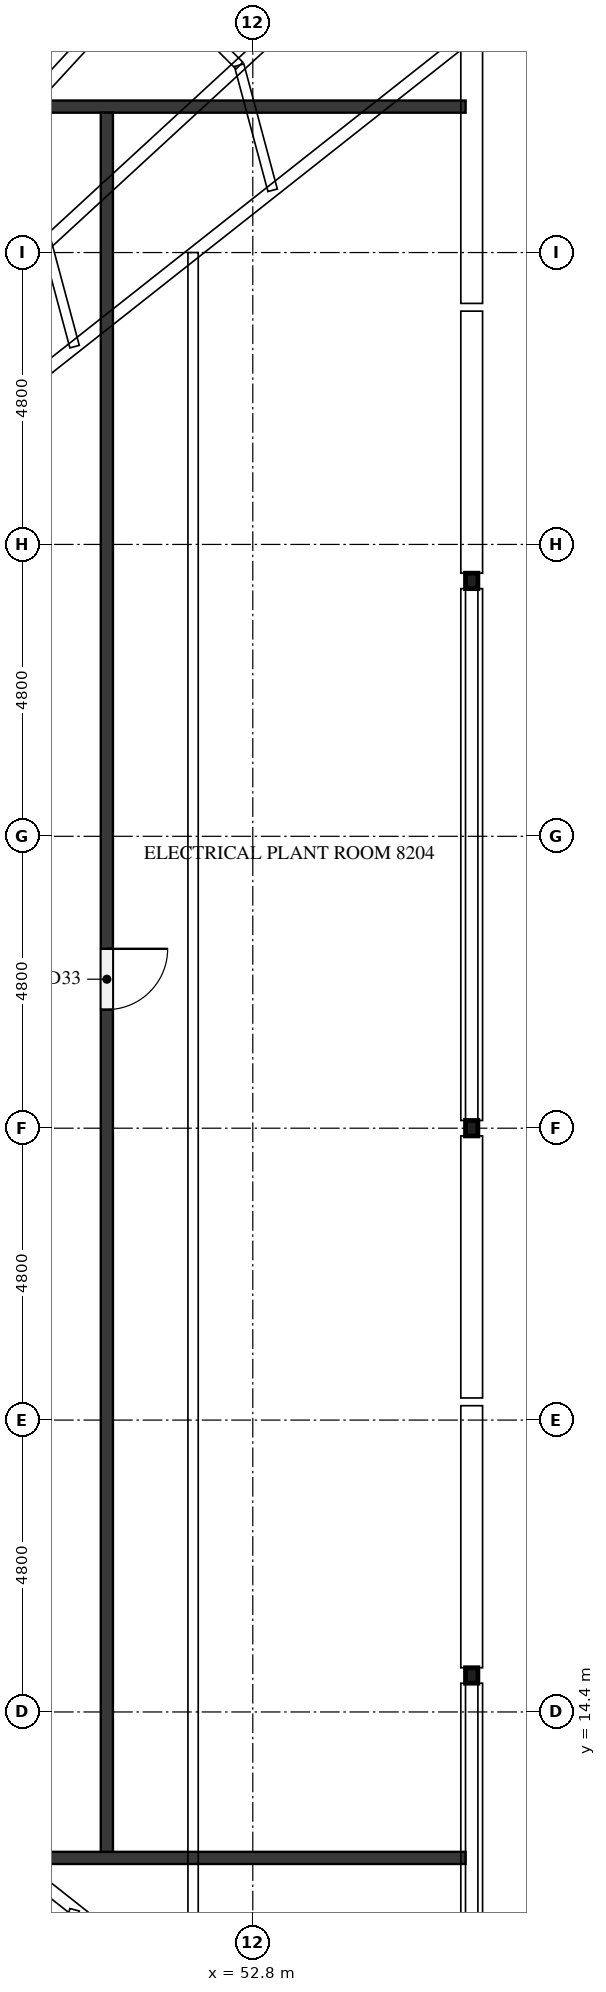
"""IFC4 building model, lengths in metres.
Left out: names, types, materials, properties, quantities, classifications, styles, units other than length and angle.
Written with IfcOpenShell. Run it as: python <this file> out.ifc"""

import sys

from ifc_helpers import new_model, si_unit, direction, frame, frame_2d, origin, origin_2d, place, context, subcontext, project, spatial, rectangle, hollow_rectangle, extrude, element, fill, save


model = new_model("IFC4")
c1 = context("Model", 3, precision=1e-05, world=origin(), true_north=direction((0.0, 1.0)))
c2 = subcontext(c1, "Body", "Model", "MODEL_VIEW")
j1 = project(units=[si_unit("LENGTHUNIT", "METRE"), si_unit("PLANEANGLEUNIT", "RADIAN")], contexts=[c1])
p1 = place(None, origin())
s1 = spatial("IfcSite", under=j1, at=p1, CompositionType="ELEMENT")
p2 = place(p1, origin())
s2 = spatial("IfcBuilding", under=s1, at=p2, CompositionType="ELEMENT")
p3 = place(p2, frame((0.0, 0.0, 317.3)))
s3 = spatial("IfcBuildingStorey", under=s2, at=p3, CompositionType="ELEMENT", Elevation=317.3)
for number, where, z_axis, x_axis in (
    (1, (56.4, 15.0, 0.0), (0.0, 0.0, 1.0), (1.0, 0.0, 0.0)),
    (2, (56.4, 24.0, 0.0), (0.0, 0.0, 1.0), (1.0, 0.0, 0.0)),
    (3, (56.4, 33.0, 0.0), (0.0, 0.0, 1.0), (1.0, 0.0, 0.0)),
):
    element("IfcColumn", number, at=place(p3, frame(where, z_axis=z_axis, x_axis=x_axis)), inside=s3, PredefinedType="COLUMN", context=c2, shape_type="SweptSolid", body=[
        extrude(hollow_rectangle(XDim=0.203, YDim=0.254, WallThickness=0.01, InnerFilletRadius=0.004, OuterFilletRadius=0.013, at=origin_2d()), origin(), (0.0, 0.0, 1.0), 3.0),
    ])
p4 = place(p3, frame((56.3, 12.0, 0.0), z_axis=(0.0, 0.0, 1.0), x_axis=(-1.0, 0.0, 0.0)))
e4 = element("IfcWall", 4, at=p4, inside=s3, PredefinedType="PARTITIONING", context=c2, shape_type="SweptSolid", body=[
    extrude(rectangle(XDim=55.0, YDim=0.2, at=frame_2d((27.5, 0.0))), origin(), (0.0, 0.0, 1.0), 3.0),
])
p5 = place(p4, frame((24.55, 0.0, 0.0)))
e5 = element("IfcOpeningElement", 5, at=p5, cuts=e4, PredefinedType="OPENING", context=c2, shape_type="SweptSolid", body=[
    extrude(rectangle(XDim=1.0, YDim=2.1, at=frame_2d((0.5, 1.05))), frame((0.0, 0.11, 0.0), z_axis=(0.0, -1.0, 0.0), x_axis=(1.0, 0.0, 0.0)), (0.0, 0.0, 1.0), 0.22),
])
p6 = place(p3, frame((1.3, 40.8, 0.0), z_axis=(0.0, 0.0, 1.0), x_axis=(1.0, 0.0, 0.0)))
e6 = element("IfcWall", 6, at=p6, inside=s3, PredefinedType="PARTITIONING", context=c2, shape_type="SweptSolid", body=[
    extrude(rectangle(XDim=55.0, YDim=0.2, at=frame_2d((27.5, 0.0))), origin(), (0.0, 0.0, 1.0), 3.0),
])
p7 = place(p6, frame((29.35, 0.0, 0.0)))
e7 = element("IfcOpeningElement", 7, at=p7, cuts=e6, PredefinedType="OPENING", context=c2, shape_type="SweptSolid", body=[
    extrude(rectangle(XDim=1.0, YDim=2.1, at=frame_2d((0.5, 1.05))), frame((0.0, 0.11, 0.0), z_axis=(0.0, -1.0, 0.0), x_axis=(1.0, 0.0, 0.0)), (0.0, 0.0, 1.0), 0.22),
])
p8 = place(p3, frame((50.4, 40.7, 0.0), z_axis=(0.0, 0.0, 1.0), x_axis=(0.0, -1.0, 0.0)))
e8 = element("IfcWall", 8, at=p8, inside=s3, PredefinedType="PARTITIONING", context=c2, shape_type="SweptSolid", body=[
    extrude(rectangle(XDim=28.6, YDim=0.2, at=frame_2d((14.3, 0.0))), origin(), (0.0, 0.0, 1.0), 3.0),
])
p9 = place(p8, frame((13.75, 0.0, 0.0)))
e9 = element("IfcOpeningElement", 9, at=p9, cuts=e8, PredefinedType="OPENING", context=c2, shape_type="SweptSolid", body=[
    extrude(rectangle(XDim=1.0, YDim=2.1, at=frame_2d((0.5, 1.05))), frame((0.0, 0.11, 0.0), z_axis=(0.0, -1.0, 0.0), x_axis=(1.0, 0.0, 0.0)), (0.0, 0.0, 1.0), 0.22),
])
p10 = place(p9, origin())
e10 = element("IfcDoor", 10, at=p10, inside=s3, OperationType="SINGLE_SWING_LEFT", PredefinedType="DOOR", context=c2, shape_type="SweptSolid", body=[
    extrude(rectangle(XDim=1.0, YDim=2.1, at=frame_2d((0.5, 1.05))), frame((0.0, 0.025, 0.0), z_axis=(0.0, -1.0, 0.0), x_axis=(1.0, 0.0, 0.0)), (0.0, 0.0, 1.0), 0.05),
])
fill(e9, e10)
save(model, sys.argv[1])
